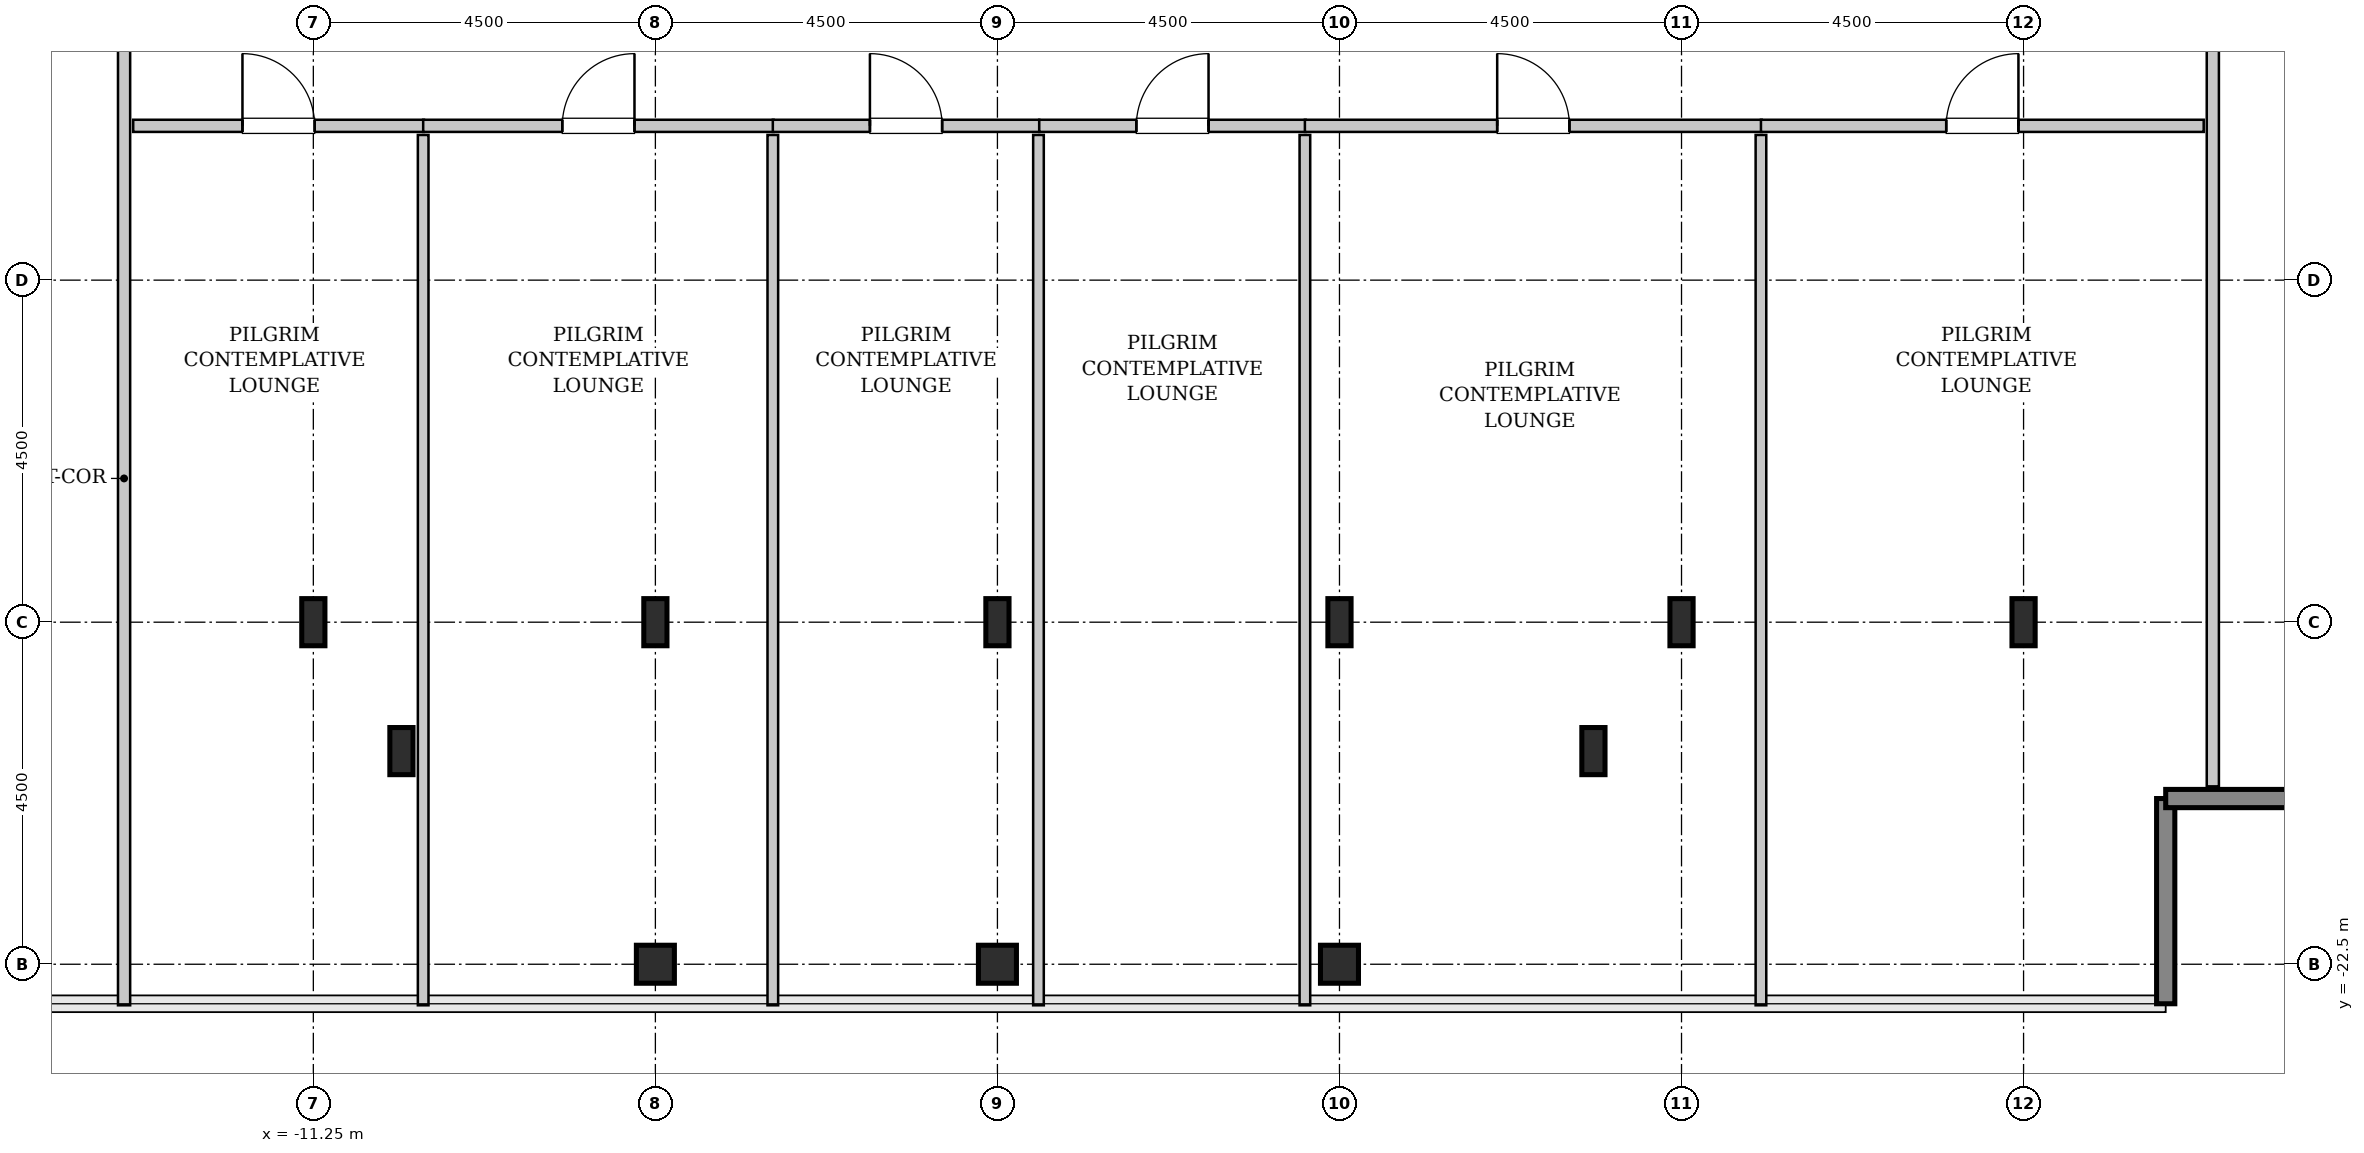
"""IFC4 building model, lengths in metres.
Left out: names, types, materials, properties, quantities, classifications, styles, units other than length and angle.
Written with IfcOpenShell. Run it as: python <this file> out.ifc"""

import sys

from ifc_helpers import new_model, si_unit, direction, frame, frame_2d, origin, origin_2d, place, context, subcontext, project, spatial, rectangle, hollow_rectangle, i_section, extrude, source, transform, mapped, element, fill, save


model = new_model("IFC4")
c1 = context("Model", 3, precision=1e-05, world=origin(), true_north=direction((0.0, 1.0)))
c2 = subcontext(c1, "Body", "Model", "MODEL_VIEW")
j1 = project(units=[si_unit("LENGTHUNIT", "METRE"), si_unit("PLANEANGLEUNIT", "RADIAN")], contexts=[c1])
p1 = place(None, origin())
s1 = spatial("IfcSite", under=j1, at=p1, CompositionType="ELEMENT")
p2 = place(p1, origin())
s2 = spatial("IfcBuilding", under=s1, at=p2, CompositionType="ELEMENT")
p3 = place(p2, frame((0.0, 0.0, 295.0)))
s3 = spatial("IfcBuildingStorey", under=s2, at=p3, CompositionType="ELEMENT", Elevation=295.0)
m1 = source(origin(), c2, "Body", "SweptSolid", [
    extrude(i_section(OverallWidth=0.305, OverallDepth=0.62, WebThickness=0.021, FlangeThickness=0.04, FilletRadius=0.027, at=origin_2d()), origin(), (0.0, 0.0, 1.0), 3.8),
])
for number, where, z_axis, x_axis in (
    (1, (-11.25, -18.0, 0.0), (0.0, 0.0, 1.0), (1.0, 0.0, 0.0)),
    (2, (-10.091, -19.696, 0.0), (0.0, 0.0, 1.0), (1.0, 0.0, 0.0)),
):
    element("IfcColumn", number, at=place(p3, frame(where, z_axis=z_axis, x_axis=x_axis)), inside=s3, PredefinedType="COLUMN", context=c2, shape_type="MappedRepresentation", body=[
        mapped(m1, transform((0.0, 0.0, 0.0), x_axis=(1.0, 0.0, 0.0), y_axis=(0.0, 1.0, 0.0), z_axis=(0.0, 0.0, 1.0), scale=1.0)),
    ])
m2 = source(origin(), c2, "Body", "SweptSolid", [
    extrude(hollow_rectangle(XDim=0.5, YDim=0.5, WallThickness=0.025, InnerFilletRadius=0.025, OuterFilletRadius=0.05, at=origin_2d()), origin(), (0.0, 0.0, 1.0), 3.8),
])
p4 = place(p3, frame((-6.75, -22.5, 0.0), z_axis=(0.0, 0.0, 1.0), x_axis=(1.0, 0.0, 0.0)))
e3 = element("IfcColumn", 3, at=p4, inside=s3, PredefinedType="COLUMN", context=c2, shape_type="MappedRepresentation", body=[
    mapped(m2, transform((0.0, 0.0, 0.0), x_axis=(1.0, 0.0, 0.0), y_axis=(0.0, 1.0, 0.0), z_axis=(0.0, 0.0, 1.0), scale=1.0)),
])
p5 = place(p3, frame((-6.75, -18.0, 0.0), z_axis=(0.0, 0.0, 1.0), x_axis=(1.0, 0.0, 0.0)))
e4 = element("IfcColumn", 4, at=p5, inside=s3, PredefinedType="COLUMN", context=c2, shape_type="MappedRepresentation", body=[
    mapped(m1, transform((0.0, 0.0, 0.0), x_axis=(1.0, 0.0, 0.0), y_axis=(0.0, 1.0, 0.0), z_axis=(0.0, 0.0, 1.0), scale=1.0)),
])
p6 = place(p3, frame((-2.25, -22.5, 0.0), z_axis=(0.0, 0.0, 1.0), x_axis=(1.0, 0.0, 0.0)))
e5 = element("IfcColumn", 5, at=p6, inside=s3, PredefinedType="COLUMN", context=c2, shape_type="MappedRepresentation", body=[
    mapped(m2, transform((0.0, 0.0, 0.0), x_axis=(1.0, 0.0, 0.0), y_axis=(0.0, 1.0, 0.0), z_axis=(0.0, 0.0, 1.0), scale=1.0)),
])
p7 = place(p3, frame((-2.25, -18.0, 0.0), z_axis=(0.0, 0.0, 1.0), x_axis=(1.0, 0.0, 0.0)))
e6 = element("IfcColumn", 6, at=p7, inside=s3, PredefinedType="COLUMN", context=c2, shape_type="MappedRepresentation", body=[
    mapped(m1, transform((0.0, 0.0, 0.0), x_axis=(1.0, 0.0, 0.0), y_axis=(0.0, 1.0, 0.0), z_axis=(0.0, 0.0, 1.0), scale=1.0)),
])
p8 = place(p3, frame((2.25, -22.5, 0.0), z_axis=(0.0, 0.0, 1.0), x_axis=(1.0, 0.0, 0.0)))
e7 = element("IfcColumn", 7, at=p8, inside=s3, PredefinedType="COLUMN", context=c2, shape_type="MappedRepresentation", body=[
    mapped(m2, transform((0.0, 0.0, 0.0), x_axis=(1.0, 0.0, 0.0), y_axis=(0.0, 1.0, 0.0), z_axis=(0.0, 0.0, 1.0), scale=1.0)),
])
for number, where, z_axis, x_axis in (
    (8, (2.25, -18.0, 0.0), (0.0, 0.0, 1.0), (1.0, 0.0, 0.0)),
    (9, (5.591, -19.696, 0.0), (0.0, 0.0, 1.0), (1.0, 0.0, 0.0)),
    (10, (6.75, -18.0, 0.0), (0.0, 0.0, 1.0), (1.0, 0.0, 0.0)),
    (11, (11.25, -18.0, 0.0), (0.0, 0.0, 1.0), (1.0, 0.0, 0.0)),
):
    element("IfcColumn", number, at=place(p3, frame(where, z_axis=z_axis, x_axis=x_axis)), inside=s3, PredefinedType="COLUMN", context=c2, shape_type="MappedRepresentation", body=[
        mapped(m1, transform((0.0, 0.0, 0.0), x_axis=(1.0, 0.0, 0.0), y_axis=(0.0, 1.0, 0.0), z_axis=(0.0, 0.0, 1.0), scale=1.0)),
    ])
m3 = source(origin(), c2, "Body", "SweptSolid", [
    extrude(rectangle(XDim=2.7, YDim=0.24, at=frame_2d((1.35, 0.0))), origin(), (0.0, 0.0, 1.0), 3.55),
])
for number, where, z_axis, x_axis in (
    (12, (13.12, -23.02, 0.0), (0.0, 0.0, 1.0), (0.0, 1.0, 0.0)),
    (13, (13.12, -20.32, 0.0), (0.0, 0.0, 1.0), (1.0, 0.0, 0.0)),
):
    element("IfcWall", number, at=place(p3, frame(where, z_axis=z_axis, x_axis=x_axis)), inside=s3, PredefinedType="SHEAR", context=c2, shape_type="MappedRepresentation", body=[
        mapped(m3, transform((0.0, 0.0, 0.0), x_axis=(1.0, 0.0, 0.0), y_axis=(0.0, 1.0, 0.0), z_axis=(0.0, 0.0, 1.0), scale=1.0)),
    ])
m4 = source(origin(), c2, "Body", "SweptSolid", [
    extrude(rectangle(XDim=17.045, YDim=0.16, at=frame_2d((8.522, 0.0))), origin(), (0.0, 0.0, 1.0), 3.535),
])
p9 = place(p3, frame((-13.74, -23.04, 0.0), z_axis=(0.0, 0.0, 1.0), x_axis=(0.0, 1.0, 0.0)))
e14 = element("IfcWall", 14, at=p9, inside=s3, PredefinedType="PARTITIONING", context=c2, shape_type="MappedRepresentation", body=[
    mapped(m4, transform((0.0, 0.0, 0.0), x_axis=(1.0, 0.0, 0.0), y_axis=(0.0, 1.0, 0.0), z_axis=(0.0, 0.0, 1.0), scale=1.0)),
])
p10 = place(p9, frame((13.812, 0.0, 0.0)))
e15 = element("IfcOpeningElement", 15, at=p10, cuts=e14, PredefinedType="OPENING", context=c2, shape_type="SweptSolid", body=[
    extrude(rectangle(XDim=0.95, YDim=2.1, at=frame_2d((0.475, 1.05))), frame((0.0, 0.09, 0.0), z_axis=(0.0, -1.0, 0.0), x_axis=(1.0, 0.0, 0.0)), (0.0, 0.0, 1.0), 0.18),
])
m5 = source(origin(), c2, "Body", "SweptSolid", [
    extrude(rectangle(XDim=11.665, YDim=0.16, at=frame_2d((5.833, 0.0))), origin(), (0.0, 0.0, 1.0), 3.535),
])
p11 = place(p3, frame((13.74, -20.16, 0.0), z_axis=(0.0, 0.0, 1.0), x_axis=(0.0, 1.0, 0.0)))
e16 = element("IfcWall", 16, at=p11, inside=s3, PredefinedType="PARTITIONING", context=c2, shape_type="MappedRepresentation", body=[
    mapped(m5, transform((0.0, 0.0, 0.0), x_axis=(1.0, 0.0, 0.0), y_axis=(0.0, 1.0, 0.0), z_axis=(0.0, 0.0, 1.0), scale=1.0)),
])
p12 = place(p11, frame((9.683, 0.0, 0.0)))
e17 = element("IfcOpeningElement", 17, at=p12, cuts=e16, PredefinedType="OPENING", context=c2, shape_type="SweptSolid", body=[
    extrude(rectangle(XDim=0.95, YDim=2.1, at=frame_2d((0.475, 1.05))), frame((0.0, 0.09, 0.0), z_axis=(0.0, -1.0, 0.0), x_axis=(1.0, 0.0, 0.0)), (0.0, 0.0, 1.0), 0.18),
])
m6 = source(origin(), c2, "Body", "SweptSolid", [
    extrude(rectangle(XDim=3.825, YDim=0.16, at=frame_2d((1.913, 0.0))), origin(), (0.0, 0.0, 1.0), 3.535),
])
p13 = place(p3, frame((-13.62, -11.47, 0.0), z_axis=(0.0, 0.0, 1.0), x_axis=(1.0, 0.0, 0.0)))
e18 = element("IfcWall", 18, at=p13, inside=s3, PredefinedType="PARTITIONING", context=c2, shape_type="MappedRepresentation", body=[
    mapped(m6, transform((0.0, 0.0, 0.0), x_axis=(1.0, 0.0, 0.0), y_axis=(0.0, 1.0, 0.0), z_axis=(0.0, 0.0, 1.0), scale=1.0)),
])
p14 = place(p13, frame((1.438, 0.0, 0.0)))
e19 = element("IfcOpeningElement", 19, at=p14, cuts=e18, PredefinedType="OPENING", context=c2, shape_type="SweptSolid", body=[
    extrude(rectangle(XDim=0.95, YDim=2.1, at=frame_2d((0.475, 1.05))), frame((0.0, 0.09, 0.0), z_axis=(0.0, -1.0, 0.0), x_axis=(1.0, 0.0, 0.0)), (0.0, 0.0, 1.0), 0.18),
])
m7 = source(origin(), c2, "Body", "SweptSolid", [
    extrude(rectangle(XDim=11.45, YDim=0.14, at=frame_2d((5.725, 0.0))), origin(), (0.0, 0.0, 1.0), 3.535),
])
p15 = place(p3, frame((-9.805, -23.04, 0.0), z_axis=(0.0, 0.0, 1.0), x_axis=(0.0, 1.0, 0.0)))
e20 = element("IfcWall", 20, at=p15, inside=s3, PredefinedType="PARTITIONING", context=c2, shape_type="MappedRepresentation", body=[
    mapped(m7, transform((0.0, 0.0, 0.0), x_axis=(1.0, 0.0, 0.0), y_axis=(0.0, 1.0, 0.0), z_axis=(0.0, 0.0, 1.0), scale=1.0)),
])
m8 = source(origin(), c2, "Body", "SweptSolid", [
    extrude(rectangle(XDim=4.61, YDim=0.16, at=frame_2d((2.305, 0.0))), origin(), (0.0, 0.0, 1.0), 3.535),
])
p16 = place(p3, frame((-9.805, -11.47, 0.0), z_axis=(0.0, 0.0, 1.0), x_axis=(1.0, 0.0, 0.0)))
e21 = element("IfcWall", 21, at=p16, inside=s3, PredefinedType="PARTITIONING", context=c2, shape_type="MappedRepresentation", body=[
    mapped(m8, transform((0.0, 0.0, 0.0), x_axis=(1.0, 0.0, 0.0), y_axis=(0.0, 1.0, 0.0), z_axis=(0.0, 0.0, 1.0), scale=1.0)),
])
p17 = place(p16, frame((1.83, 0.0, 0.0)))
e22 = element("IfcOpeningElement", 22, at=p17, cuts=e21, PredefinedType="OPENING", context=c2, shape_type="SweptSolid", body=[
    extrude(rectangle(XDim=0.95, YDim=2.1, at=frame_2d((0.475, 1.05))), frame((0.0, 0.09, 0.0), z_axis=(0.0, -1.0, 0.0), x_axis=(1.0, 0.0, 0.0)), (0.0, 0.0, 1.0), 0.18),
])
p18 = place(p3, frame((-5.205, -23.04, 0.0), z_axis=(0.0, 0.0, 1.0), x_axis=(0.0, 1.0, 0.0)))
e23 = element("IfcWall", 23, at=p18, inside=s3, PredefinedType="PARTITIONING", context=c2, shape_type="MappedRepresentation", body=[
    mapped(m7, transform((0.0, 0.0, 0.0), x_axis=(1.0, 0.0, 0.0), y_axis=(0.0, 1.0, 0.0), z_axis=(0.0, 0.0, 1.0), scale=1.0)),
])
m9 = source(origin(), c2, "Body", "SweptSolid", [
    extrude(rectangle(XDim=3.505, YDim=0.16, at=frame_2d((1.752, 0.0))), origin(), (0.0, 0.0, 1.0), 3.535),
])
p19 = place(p3, frame((-5.205, -11.47, 0.0), z_axis=(0.0, 0.0, 1.0), x_axis=(1.0, 0.0, 0.0)))
e24 = element("IfcWall", 24, at=p19, inside=s3, PredefinedType="PARTITIONING", context=c2, shape_type="MappedRepresentation", body=[
    mapped(m9, transform((0.0, 0.0, 0.0), x_axis=(1.0, 0.0, 0.0), y_axis=(0.0, 1.0, 0.0), z_axis=(0.0, 0.0, 1.0), scale=1.0)),
])
p20 = place(p19, frame((1.278, 0.0, 0.0)))
e25 = element("IfcOpeningElement", 25, at=p20, cuts=e24, PredefinedType="OPENING", context=c2, shape_type="SweptSolid", body=[
    extrude(rectangle(XDim=0.95, YDim=2.1, at=frame_2d((0.475, 1.05))), frame((0.0, 0.09, 0.0), z_axis=(0.0, -1.0, 0.0), x_axis=(1.0, 0.0, 0.0)), (0.0, 0.0, 1.0), 0.18),
])
p21 = place(p3, frame((-1.71, -23.04, 0.0), z_axis=(0.0, 0.0, 1.0), x_axis=(0.0, 1.0, 0.0)))
e26 = element("IfcWall", 26, at=p21, inside=s3, PredefinedType="PARTITIONING", context=c2, shape_type="MappedRepresentation", body=[
    mapped(m7, transform((0.0, 0.0, 0.0), x_axis=(1.0, 0.0, 0.0), y_axis=(0.0, 1.0, 0.0), z_axis=(0.0, 0.0, 1.0), scale=1.0)),
])
m10 = source(origin(), c2, "Body", "SweptSolid", [
    extrude(rectangle(XDim=3.505, YDim=0.16, at=frame_2d((1.752, 0.0))), origin(), (0.0, 0.0, 1.0), 3.535),
])
p22 = place(p3, frame((-1.7, -11.47, 0.0), z_axis=(0.0, 0.0, 1.0), x_axis=(1.0, 0.0, 0.0)))
e27 = element("IfcWall", 27, at=p22, inside=s3, PredefinedType="PARTITIONING", context=c2, shape_type="MappedRepresentation", body=[
    mapped(m10, transform((0.0, 0.0, 0.0), x_axis=(1.0, 0.0, 0.0), y_axis=(0.0, 1.0, 0.0), z_axis=(0.0, 0.0, 1.0), scale=1.0)),
])
p23 = place(p22, frame((1.278, 0.0, 0.0)))
e28 = element("IfcOpeningElement", 28, at=p23, cuts=e27, PredefinedType="OPENING", context=c2, shape_type="SweptSolid", body=[
    extrude(rectangle(XDim=0.95, YDim=2.1, at=frame_2d((0.475, 1.05))), frame((0.0, 0.09, 0.0), z_axis=(0.0, -1.0, 0.0), x_axis=(1.0, 0.0, 0.0)), (0.0, 0.0, 1.0), 0.18),
])
m11 = source(origin(), c2, "Body", "SweptSolid", [
    extrude(rectangle(XDim=11.45, YDim=0.14, at=frame_2d((5.725, 0.0))), origin(), (0.0, 0.0, 1.0), 2.925),
])
p24 = place(p3, frame((1.795, -23.04, 0.0), z_axis=(0.0, 0.0, 1.0), x_axis=(0.0, 1.0, 0.0)))
e29 = element("IfcWall", 29, at=p24, inside=s3, PredefinedType="PARTITIONING", context=c2, shape_type="MappedRepresentation", body=[
    mapped(m11, transform((0.0, 0.0, 0.0), x_axis=(1.0, 0.0, 0.0), y_axis=(0.0, 1.0, 0.0), z_axis=(0.0, 0.0, 1.0), scale=1.0)),
])
m12 = source(origin(), c2, "Body", "SweptSolid", [
    extrude(rectangle(XDim=6.01, YDim=0.16, at=frame_2d((3.005, 0.0))), origin(), (0.0, 0.0, 1.0), 3.535),
])
p25 = place(p3, frame((1.795, -11.47, 0.0), z_axis=(0.0, 0.0, 1.0), x_axis=(1.0, 0.0, 0.0)))
e30 = element("IfcWall", 30, at=p25, inside=s3, PredefinedType="PARTITIONING", context=c2, shape_type="MappedRepresentation", body=[
    mapped(m12, transform((0.0, 0.0, 0.0), x_axis=(1.0, 0.0, 0.0), y_axis=(0.0, 1.0, 0.0), z_axis=(0.0, 0.0, 1.0), scale=1.0)),
])
p26 = place(p25, frame((2.53, 0.0, 0.0)))
e31 = element("IfcOpeningElement", 31, at=p26, cuts=e30, PredefinedType="OPENING", context=c2, shape_type="SweptSolid", body=[
    extrude(rectangle(XDim=0.95, YDim=2.1, at=frame_2d((0.475, 1.05))), frame((0.0, 0.09, 0.0), z_axis=(0.0, -1.0, 0.0), x_axis=(1.0, 0.0, 0.0)), (0.0, 0.0, 1.0), 0.18),
])
p27 = place(p3, frame((7.795, -23.04, 0.0), z_axis=(0.0, 0.0, 1.0), x_axis=(0.0, 1.0, 0.0)))
e32 = element("IfcWall", 32, at=p27, inside=s3, PredefinedType="PARTITIONING", context=c2, shape_type="MappedRepresentation", body=[
    mapped(m7, transform((0.0, 0.0, 0.0), x_axis=(1.0, 0.0, 0.0), y_axis=(0.0, 1.0, 0.0), z_axis=(0.0, 0.0, 1.0), scale=1.0)),
])
m13 = source(origin(), c2, "Body", "SweptSolid", [
    extrude(rectangle(XDim=5.825, YDim=0.16, at=frame_2d((2.913, 0.0))), origin(), (0.0, 0.0, 1.0), 3.535),
])
p28 = place(p3, frame((7.795, -11.47, 0.0), z_axis=(0.0, 0.0, 1.0), x_axis=(1.0, 0.0, 0.0)))
e33 = element("IfcWall", 33, at=p28, inside=s3, PredefinedType="PARTITIONING", context=c2, shape_type="MappedRepresentation", body=[
    mapped(m13, transform((0.0, 0.0, 0.0), x_axis=(1.0, 0.0, 0.0), y_axis=(0.0, 1.0, 0.0), z_axis=(0.0, 0.0, 1.0), scale=1.0)),
])
p29 = place(p28, frame((2.438, 0.0, 0.0)))
e34 = element("IfcOpeningElement", 34, at=p29, cuts=e33, PredefinedType="OPENING", context=c2, shape_type="SweptSolid", body=[
    extrude(rectangle(XDim=0.95, YDim=2.1, at=frame_2d((0.475, 1.05))), frame((0.0, 0.09, 0.0), z_axis=(0.0, -1.0, 0.0), x_axis=(1.0, 0.0, 0.0)), (0.0, 0.0, 1.0), 0.18),
])
m14 = source(origin(), c2, "Body", "SweptSolid", [
    extrude(rectangle(XDim=0.95, YDim=2.1, at=frame_2d((0.475, 1.05))), frame((0.0, 0.025, 0.0), z_axis=(0.0, -1.0, 0.0), x_axis=(1.0, 0.0, 0.0)), (0.0, 0.0, 1.0), 0.05),
])
p30 = place(p14, origin())
e35 = element("IfcDoor", 35, at=p30, inside=s3, OperationType="SINGLE_SWING_LEFT", PredefinedType="DOOR", context=c2, shape_type="MappedRepresentation", body=[
    mapped(m14, transform((0.0, 0.0, 0.0), x_axis=(1.0, 0.0, 0.0), y_axis=(0.0, 1.0, 0.0), z_axis=(0.0, 0.0, 1.0), scale=1.0)),
])
fill(e19, e35)
p31 = place(p17, origin())
e36 = element("IfcDoor", 36, at=p31, inside=s3, OperationType="SINGLE_SWING_RIGHT", PredefinedType="DOOR", context=c2, shape_type="MappedRepresentation", body=[
    mapped(m14, transform((0.0, 0.0, 0.0), x_axis=(1.0, 0.0, 0.0), y_axis=(0.0, 1.0, 0.0), z_axis=(0.0, 0.0, 1.0), scale=1.0)),
])
fill(e22, e36)
p32 = place(p20, origin())
e37 = element("IfcDoor", 37, at=p32, inside=s3, OperationType="SINGLE_SWING_LEFT", PredefinedType="DOOR", context=c2, shape_type="MappedRepresentation", body=[
    mapped(m14, transform((0.0, 0.0, 0.0), x_axis=(1.0, 0.0, 0.0), y_axis=(0.0, 1.0, 0.0), z_axis=(0.0, 0.0, 1.0), scale=1.0)),
])
fill(e25, e37)
p33 = place(p23, origin())
e38 = element("IfcDoor", 38, at=p33, inside=s3, OperationType="SINGLE_SWING_RIGHT", PredefinedType="DOOR", context=c2, shape_type="MappedRepresentation", body=[
    mapped(m14, transform((0.0, 0.0, 0.0), x_axis=(1.0, 0.0, 0.0), y_axis=(0.0, 1.0, 0.0), z_axis=(0.0, 0.0, 1.0), scale=1.0)),
])
fill(e28, e38)
p34 = place(p26, origin())
e39 = element("IfcDoor", 39, at=p34, inside=s3, OperationType="SINGLE_SWING_LEFT", PredefinedType="DOOR", context=c2, shape_type="MappedRepresentation", body=[
    mapped(m14, transform((0.0, 0.0, 0.0), x_axis=(1.0, 0.0, 0.0), y_axis=(0.0, 1.0, 0.0), z_axis=(0.0, 0.0, 1.0), scale=1.0)),
])
fill(e31, e39)
p35 = place(p29, origin())
e40 = element("IfcDoor", 40, at=p35, inside=s3, OperationType="SINGLE_SWING_RIGHT", PredefinedType="DOOR", context=c2, shape_type="MappedRepresentation", body=[
    mapped(m14, transform((0.0, 0.0, 0.0), x_axis=(1.0, 0.0, 0.0), y_axis=(0.0, 1.0, 0.0), z_axis=(0.0, 0.0, 1.0), scale=1.0)),
])
fill(e34, e40)
save(model, sys.argv[1])
